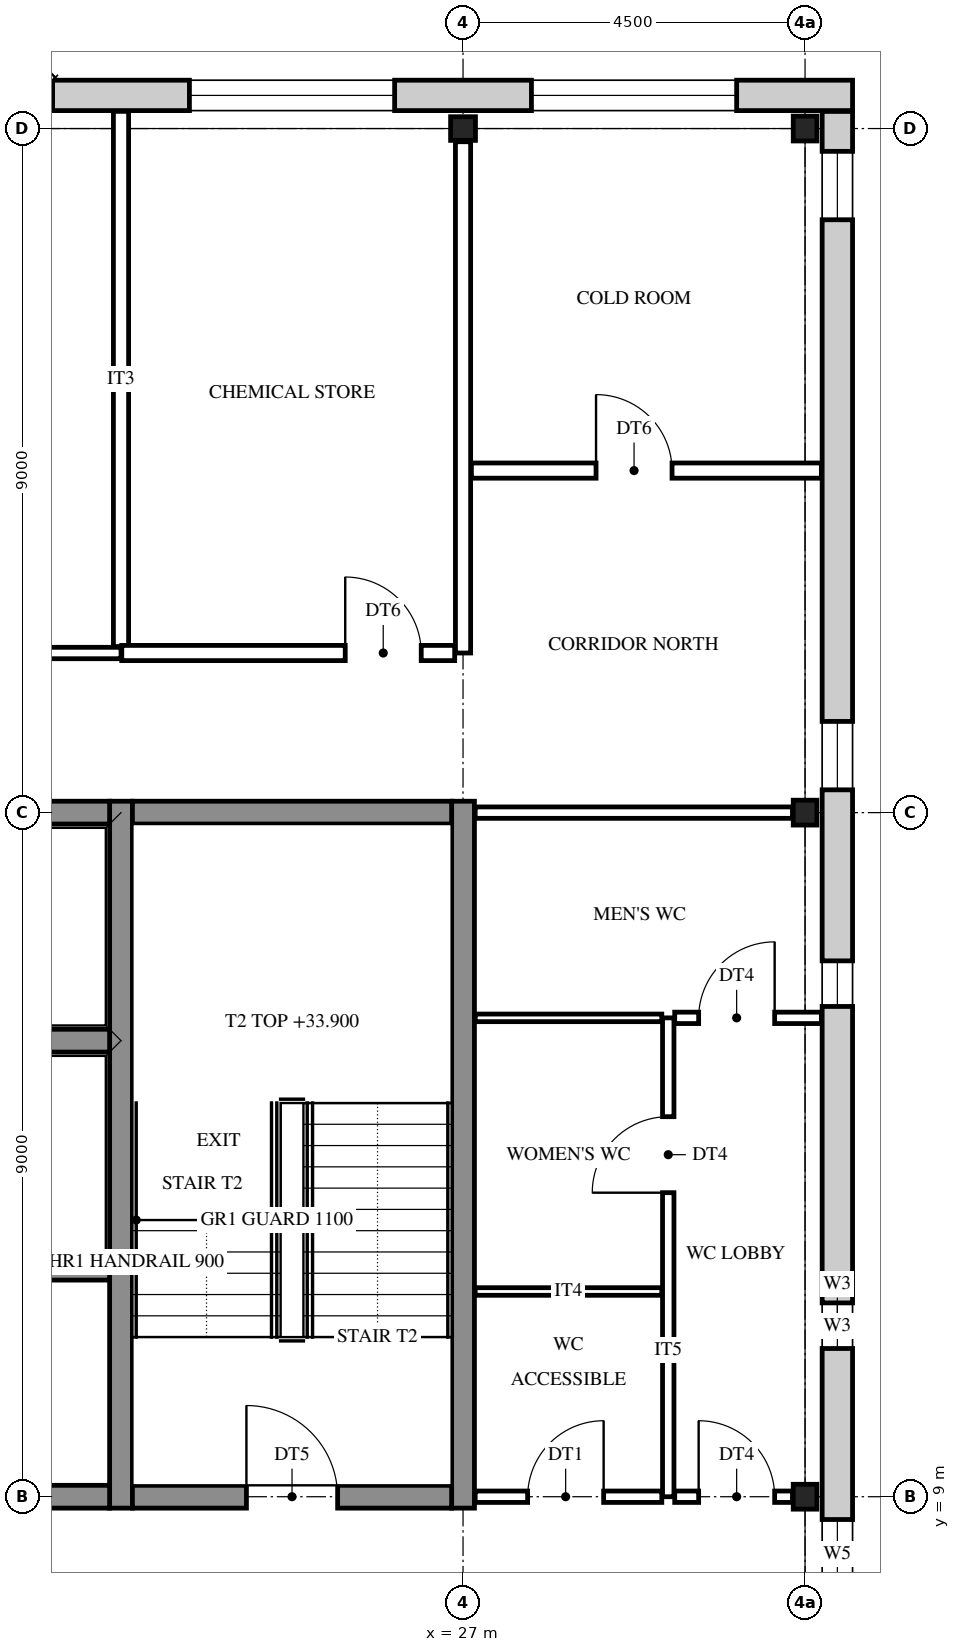
"""IFC4 building model, lengths in metres.
Left out: names, types, materials, properties, quantities, classifications, styles, units other than length and angle.
Written with IfcOpenShell. Run it as: python <this file> out.ifc"""

import sys

from ifc_helpers import new_model, si_unit, direction, frame, frame_2d, origin, origin_2d, place, context, subcontext, project, spatial, rectangle, i_section, extrude, element, fill, save


model = new_model("IFC4")
c1 = context("Model", 3, precision=1e-05, world=origin(), true_north=direction((0.0, 1.0)))
c2 = subcontext(c1, "Body", "Model", "MODEL_VIEW")
j1 = project(units=[si_unit("LENGTHUNIT", "METRE"), si_unit("PLANEANGLEUNIT", "RADIAN")], contexts=[c1])
p1 = place(None, origin())
s1 = spatial("IfcSite", under=j1, at=p1, CompositionType="ELEMENT")
p2 = place(p1, origin())
s2 = spatial("IfcBuilding", under=s1, at=p2, CompositionType="ELEMENT")
p3 = place(p2, frame((0.0, 0.0, 31.8)))
s3 = spatial("IfcBuildingStorey", under=s2, at=p3, CompositionType="ELEMENT", Elevation=31.8)
for number, where, z_axis, x_axis in (
    (1, (27.0, 27.0, 0.0), (0.0, 0.0, 1.0), (0.0, 1.0, 0.0)),
    (2, (31.5, 9.0, 0.0), (0.0, 0.0, 1.0), (1.0, 0.0, 0.0)),
    (3, (31.5, 18.0, 0.0), (0.0, 0.0, 1.0), (1.0, 0.0, 0.0)),
    (4, (31.5, 27.0, 0.0), (0.0, 0.0, 1.0), (1.0, 0.0, 0.0)),
):
    element("IfcColumn", number, at=place(p3, frame(where, z_axis=z_axis, x_axis=x_axis)), inside=s3, PredefinedType="COLUMN", context=c2, shape_type="SweptSolid", body=[
        extrude(i_section(OverallWidth=0.311, OverallDepth=0.327, WebThickness=0.016, FlangeThickness=0.025, FilletRadius=0.017, at=origin_2d()), origin(), (0.0, 0.0, 1.0), 4.2),
    ])
for number, where, z_axis, x_axis in (
    (5, (22.5, 8.85, 0.0), (0.0, 0.0, 1.0), (0.0, 1.0, 0.0)),
    (6, (27.0, 8.85, 0.0), (0.0, 0.0, 1.0), (0.0, 1.0, 0.0)),
):
    element("IfcWall", number, at=place(p3, frame(where, z_axis=z_axis, x_axis=x_axis)), inside=s3, PredefinedType="SHEAR", context=c2, shape_type="SweptSolid", body=[
        extrude(rectangle(XDim=9.3, YDim=0.3, at=frame_2d((4.65, 0.0))), origin(), (0.0, 0.0, 1.0), 4.2),
    ])
p4 = place(p3, frame((19.65, 9.0, 0.0), z_axis=(0.0, 0.0, 1.0), x_axis=(1.0, 0.0, 0.0)))
e7 = element("IfcWall", 7, at=p4, inside=s3, PredefinedType="SHEAR", context=c2, shape_type="SweptSolid", body=[
    extrude(rectangle(XDim=2.7, YDim=0.3, at=frame_2d((1.35, 0.0))), origin(), (0.0, 0.0, 1.0), 4.2),
])
p5 = place(p3, frame((22.65, 9.0, 0.0), z_axis=(0.0, 0.0, 1.0), x_axis=(1.0, 0.0, 0.0)))
e8 = element("IfcWall", 8, at=p5, inside=s3, PredefinedType="SHEAR", context=c2, shape_type="SweptSolid", body=[
    extrude(rectangle(XDim=4.2, YDim=0.3, at=frame_2d((2.1, 0.0))), origin(), (0.0, 0.0, 1.0), 4.2),
])
p6 = place(p5, frame((1.5, 0.0, 0.0)))
e9 = element("IfcOpeningElement", 9, at=p6, cuts=e8, PredefinedType="OPENING", context=c2, shape_type="SweptSolid", body=[
    extrude(rectangle(XDim=1.2, YDim=2.1, at=frame_2d((0.6, 1.05))), frame((0.0, 0.16, 0.0), z_axis=(0.0, -1.0, 0.0), x_axis=(1.0, 0.0, 0.0)), (0.0, 0.0, 1.0), 0.32),
])
for number, where, z_axis, x_axis in (
    (10, (19.65, 12.0, 0.0), (0.0, 0.0, 1.0), (1.0, 0.0, 0.0)),
    (11, (19.65, 15.0, 0.0), (0.0, 0.0, 1.0), (1.0, 0.0, 0.0)),
    (12, (19.65, 18.0, 0.0), (0.0, 0.0, 1.0), (1.0, 0.0, 0.0)),
):
    element("IfcWall", number, at=place(p3, frame(where, z_axis=z_axis, x_axis=x_axis)), inside=s3, PredefinedType="SHEAR", context=c2, shape_type="SweptSolid", body=[
        extrude(rectangle(XDim=2.7, YDim=0.3, at=frame_2d((1.35, 0.0))), origin(), (0.0, 0.0, 1.0), 4.2),
    ])
p7 = place(p3, frame((22.65, 18.0, 0.0), z_axis=(0.0, 0.0, 1.0), x_axis=(1.0, 0.0, 0.0)))
e13 = element("IfcWall", 13, at=p7, inside=s3, PredefinedType="SHEAR", context=c2, shape_type="SweptSolid", body=[
    extrude(rectangle(XDim=4.2, YDim=0.3, at=frame_2d((2.1, 0.0))), origin(), (0.0, 0.0, 1.0), 4.2),
])
p8 = place(p3, frame((-0.625, 27.436, 0.0), z_axis=(0.0, 0.0, 1.0), x_axis=(1.0, 0.0, 0.0)))
e14 = element("IfcWall", 14, at=p8, inside=s3, PredefinedType="STANDARD", context=c2, shape_type="SweptSolid", body=[
    extrude(rectangle(XDim=32.75, YDim=0.4, at=frame_2d((16.375, 0.0))), origin(), (0.0, 0.0, 1.0), 4.2),
])
p9 = place(p8, frame((1.525, 0.0, 0.9)))
e15 = element("IfcOpeningElement", 15, at=p9, cuts=e14, PredefinedType="OPENING", context=c2, shape_type="SweptSolid", body=[
    extrude(rectangle(XDim=2.7, YDim=2.5, at=frame_2d((1.35, 1.25))), frame((0.0, 0.21, 0.0), z_axis=(0.0, -1.0, 0.0), x_axis=(1.0, 0.0, 0.0)), (0.0, 0.0, 1.0), 0.42),
])
p10 = place(p8, frame((6.025, 0.0, 0.9)))
e16 = element("IfcOpeningElement", 16, at=p10, cuts=e14, PredefinedType="OPENING", context=c2, shape_type="SweptSolid", body=[
    extrude(rectangle(XDim=2.7, YDim=2.5, at=frame_2d((1.35, 1.25))), frame((0.0, 0.21, 0.0), z_axis=(0.0, -1.0, 0.0), x_axis=(1.0, 0.0, 0.0)), (0.0, 0.0, 1.0), 0.42),
])
p11 = place(p8, frame((10.525, 0.0, 0.9)))
e17 = element("IfcOpeningElement", 17, at=p11, cuts=e14, PredefinedType="OPENING", context=c2, shape_type="SweptSolid", body=[
    extrude(rectangle(XDim=2.7, YDim=2.5, at=frame_2d((1.35, 1.25))), frame((0.0, 0.21, 0.0), z_axis=(0.0, -1.0, 0.0), x_axis=(1.0, 0.0, 0.0)), (0.0, 0.0, 1.0), 0.42),
])
p12 = place(p8, frame((15.025, 0.0, 0.9)))
e18 = element("IfcOpeningElement", 18, at=p12, cuts=e14, PredefinedType="OPENING", context=c2, shape_type="SweptSolid", body=[
    extrude(rectangle(XDim=2.7, YDim=2.5, at=frame_2d((1.35, 1.25))), frame((0.0, 0.21, 0.0), z_axis=(0.0, -1.0, 0.0), x_axis=(1.0, 0.0, 0.0)), (0.0, 0.0, 1.0), 0.42),
])
p13 = place(p8, frame((19.525, 0.0, 0.9)))
e19 = element("IfcOpeningElement", 19, at=p13, cuts=e14, PredefinedType="OPENING", context=c2, shape_type="SweptSolid", body=[
    extrude(rectangle(XDim=2.7, YDim=2.5, at=frame_2d((1.35, 1.25))), frame((0.0, 0.21, 0.0), z_axis=(0.0, -1.0, 0.0), x_axis=(1.0, 0.0, 0.0)), (0.0, 0.0, 1.0), 0.42),
])
p14 = place(p8, frame((24.025, 0.0, 0.9)))
e20 = element("IfcOpeningElement", 20, at=p14, cuts=e14, PredefinedType="OPENING", context=c2, shape_type="SweptSolid", body=[
    extrude(rectangle(XDim=2.7, YDim=2.5, at=frame_2d((1.35, 1.25))), frame((0.0, 0.21, 0.0), z_axis=(0.0, -1.0, 0.0), x_axis=(1.0, 0.0, 0.0)), (0.0, 0.0, 1.0), 0.42),
])
p15 = place(p8, frame((28.525, 0.0, 0.9)))
e21 = element("IfcOpeningElement", 21, at=p15, cuts=e14, PredefinedType="OPENING", context=c2, shape_type="SweptSolid", body=[
    extrude(rectangle(XDim=2.7, YDim=2.5, at=frame_2d((1.35, 1.25))), frame((0.0, 0.21, 0.0), z_axis=(0.0, -1.0, 0.0), x_axis=(1.0, 0.0, 0.0)), (0.0, 0.0, 1.0), 0.42),
])
p16 = place(p3, frame((31.925, 27.225, 0.0), z_axis=(0.0, 0.0, 1.0), x_axis=(0.0, -1.0, 0.0)))
e22 = element("IfcWall", 22, at=p16, inside=s3, PredefinedType="STANDARD", context=c2, shape_type="SweptSolid", body=[
    extrude(rectangle(XDim=27.45, YDim=0.4, at=frame_2d((13.725, 0.0))), origin(), (0.0, 0.0, 1.0), 4.2),
])
p17 = place(p16, frame((26.025, 0.0, 0.9)))
e23 = element("IfcOpeningElement", 23, at=p17, cuts=e22, PredefinedType="OPENING", context=c2, shape_type="SweptSolid", body=[
    extrude(rectangle(XDim=0.9, YDim=2.0, at=frame_2d((0.45, 1.0))), frame((0.0, 0.21, 0.0), z_axis=(0.0, -1.0, 0.0), x_axis=(1.0, 0.0, 0.0)), (0.0, 0.0, 1.0), 0.42),
])
p18 = place(p16, frame((18.525, 0.0, 0.9)))
e24 = element("IfcOpeningElement", 24, at=p18, cuts=e22, PredefinedType="OPENING", context=c2, shape_type="SweptSolid", body=[
    extrude(rectangle(XDim=0.9, YDim=2.0, at=frame_2d((0.45, 1.0))), frame((0.0, 0.21, 0.0), z_axis=(0.0, -1.0, 0.0), x_axis=(1.0, 0.0, 0.0)), (0.0, 0.0, 1.0), 0.42),
])
p19 = place(p16, frame((15.675, 0.0, 1.6)))
e25 = element("IfcOpeningElement", 25, at=p19, cuts=e22, PredefinedType="OPENING", context=c2, shape_type="SweptSolid", body=[
    extrude(rectangle(XDim=0.6, YDim=0.9, at=frame_2d((0.3, 0.45))), frame((0.0, 0.21, 0.0), z_axis=(0.0, -1.0, 0.0), x_axis=(1.0, 0.0, 0.0)), (0.0, 0.0, 1.0), 0.42),
])
p20 = place(p16, frame((11.175, 0.0, 1.6)))
e26 = element("IfcOpeningElement", 26, at=p20, cuts=e22, PredefinedType="OPENING", context=c2, shape_type="SweptSolid", body=[
    extrude(rectangle(XDim=0.6, YDim=0.9, at=frame_2d((0.3, 0.45))), frame((0.0, 0.21, 0.0), z_axis=(0.0, -1.0, 0.0), x_axis=(1.0, 0.0, 0.0)), (0.0, 0.0, 1.0), 0.42),
])
p21 = place(p16, frame((8.025, 0.0, 0.9)))
e27 = element("IfcOpeningElement", 27, at=p21, cuts=e22, PredefinedType="OPENING", context=c2, shape_type="SweptSolid", body=[
    extrude(rectangle(XDim=0.9, YDim=2.0, at=frame_2d((0.45, 1.0))), frame((0.0, 0.21, 0.0), z_axis=(0.0, -1.0, 0.0), x_axis=(1.0, 0.0, 0.0)), (0.0, 0.0, 1.0), 0.42),
])
p22 = place(p16, frame((0.525, 0.0, 0.9)))
e28 = element("IfcOpeningElement", 28, at=p22, cuts=e22, PredefinedType="OPENING", context=c2, shape_type="SweptSolid", body=[
    extrude(rectangle(XDim=0.9, YDim=2.0, at=frame_2d((0.45, 1.0))), frame((0.0, 0.21, 0.0), z_axis=(0.0, -1.0, 0.0), x_axis=(1.0, 0.0, 0.0)), (0.0, 0.0, 1.0), 0.42),
])
p23 = place(p3, frame((22.5, 20.185, 0.0), z_axis=(0.0, 0.0, 1.0), x_axis=(0.0, 1.0, 0.0)))
e29 = element("IfcWall", 29, at=p23, inside=s3, PredefinedType="PARTITIONING", context=c2, shape_type="SweptSolid", body=[
    extrude(rectangle(XDim=7.041, YDim=0.2, at=frame_2d((3.521, 0.0))), origin(), (0.0, 0.0, 1.0), 3.537),
])
p24 = place(p3, frame((27.0, 20.1, 0.0), z_axis=(0.0, 0.0, 1.0), x_axis=(0.0, 1.0, 0.0)))
e30 = element("IfcWall", 30, at=p24, inside=s3, PredefinedType="PARTITIONING", context=c2, shape_type="SweptSolid", body=[
    extrude(rectangle(XDim=6.726, YDim=0.2, at=frame_2d((3.363, 0.0))), origin(), (0.0, 0.0, 1.0), 3.537),
])
p25 = place(p3, frame((29.7, 9.0, 0.0), z_axis=(0.0, 0.0, 1.0), x_axis=(0.0, 1.0, 0.0)))
e31 = element("IfcWall", 31, at=p25, inside=s3, PredefinedType="PARTITIONING", context=c2, shape_type="SweptSolid", body=[
    extrude(rectangle(XDim=6.3, YDim=0.15, at=frame_2d((3.15, 0.0))), origin(), (0.0, 0.0, 1.0), 3.537),
])
p26 = place(p25, frame((4.0, 0.0, 0.0)))
e32 = element("IfcOpeningElement", 32, at=p26, cuts=e31, PredefinedType="OPENING", context=c2, shape_type="SweptSolid", body=[
    extrude(rectangle(XDim=1.0, YDim=2.1, at=frame_2d((0.5, 1.05))), frame((0.0, 0.085, 0.0), z_axis=(0.0, -1.0, 0.0), x_axis=(1.0, 0.0, 0.0)), (0.0, 0.0, 1.0), 0.17),
])
p27 = place(p3, frame((27.16, 9.0, 0.0), z_axis=(0.0, 0.0, 1.0), x_axis=(1.0, 0.0, 0.0)))
e33 = element("IfcWall", 33, at=p27, inside=s3, PredefinedType="PARTITIONING", context=c2, shape_type="SweptSolid", body=[
    extrude(rectangle(XDim=2.455, YDim=0.15, at=frame_2d((1.228, 0.0))), origin(), (0.0, 0.0, 1.0), 3.537),
])
p28 = place(p27, frame((0.69, 0.0, 0.0)))
e34 = element("IfcOpeningElement", 34, at=p28, cuts=e33, PredefinedType="OPENING", context=c2, shape_type="SweptSolid", body=[
    extrude(rectangle(XDim=1.0, YDim=2.1, at=frame_2d((0.5, 1.05))), frame((0.0, 0.085, 0.0), z_axis=(0.0, -1.0, 0.0), x_axis=(1.0, 0.0, 0.0)), (0.0, 0.0, 1.0), 0.17),
])
p29 = place(p3, frame((29.785, 9.0, 0.0), z_axis=(0.0, 0.0, 1.0), x_axis=(1.0, 0.0, 0.0)))
e35 = element("IfcWall", 35, at=p29, inside=s3, PredefinedType="PARTITIONING", context=c2, shape_type="SweptSolid", body=[
    extrude(rectangle(XDim=1.55, YDim=0.15, at=frame_2d((0.775, 0.0))), origin(), (0.0, 0.0, 1.0), 3.537),
])
p30 = place(p29, frame((0.315, 0.0, 0.0)))
e36 = element("IfcOpeningElement", 36, at=p30, cuts=e35, PredefinedType="OPENING", context=c2, shape_type="SweptSolid", body=[
    extrude(rectangle(XDim=1.0, YDim=2.1, at=frame_2d((0.5, 1.05))), frame((0.0, 0.085, 0.0), z_axis=(0.0, -1.0, 0.0), x_axis=(1.0, 0.0, 0.0)), (0.0, 0.0, 1.0), 0.17),
])
for number, where, z_axis, x_axis in (
    (37, (27.16, 11.7, 0.0), (0.0, 0.0, 1.0), (1.0, 0.0, 0.0)),
    (38, (27.16, 15.3, 0.0), (0.0, 0.0, 1.0), (1.0, 0.0, 0.0)),
):
    element("IfcWall", number, at=place(p3, frame(where, z_axis=z_axis, x_axis=x_axis)), inside=s3, PredefinedType="PARTITIONING", context=c2, shape_type="SweptSolid", body=[
        extrude(rectangle(XDim=2.455, YDim=0.1, at=frame_2d((1.228, 0.0))), origin(), (0.0, 0.0, 1.0), 3.537),
    ])
p31 = place(p3, frame((29.785, 15.3, 0.0), z_axis=(0.0, 0.0, 1.0), x_axis=(1.0, 0.0, 0.0)))
e39 = element("IfcWall", 39, at=p31, inside=s3, PredefinedType="PARTITIONING", context=c2, shape_type="SweptSolid", body=[
    extrude(rectangle(XDim=1.93, YDim=0.15, at=frame_2d((0.965, 0.0))), origin(), (0.0, 0.0, 1.0), 3.537),
])
p32 = place(p31, frame((0.315, 0.0, 0.0)))
e40 = element("IfcOpeningElement", 40, at=p32, cuts=e39, PredefinedType="OPENING", context=c2, shape_type="SweptSolid", body=[
    extrude(rectangle(XDim=1.0, YDim=2.1, at=frame_2d((0.5, 1.05))), frame((0.0, 0.085, 0.0), z_axis=(0.0, -1.0, 0.0), x_axis=(1.0, 0.0, 0.0)), (0.0, 0.0, 1.0), 0.17),
])
p33 = place(p3, frame((27.16, 18.0, 0.0), z_axis=(0.0, 0.0, 1.0), x_axis=(1.0, 0.0, 0.0)))
e41 = element("IfcWall", 41, at=p33, inside=s3, PredefinedType="PARTITIONING", context=c2, shape_type="SweptSolid", body=[
    extrude(rectangle(XDim=4.175, YDim=0.15, at=frame_2d((2.087, 0.0))), origin(), (0.0, 0.0, 1.0), 3.537),
])
p34 = place(p3, frame((6.9, 20.1, 0.0), z_axis=(0.0, 0.0, 1.0), x_axis=(1.0, 0.0, 0.0)))
e42 = element("IfcWall", 42, at=p34, inside=s3, PredefinedType="PARTITIONING", context=c2, shape_type="SweptSolid", body=[
    extrude(rectangle(XDim=15.6, YDim=0.15, at=frame_2d((7.8, 0.0))), origin(), (0.0, 0.0, 1.0), 3.537),
])
p35 = place(p34, frame((2.75, 0.0, 0.0)))
e43 = element("IfcOpeningElement", 43, at=p35, cuts=e42, PredefinedType="OPENING", context=c2, shape_type="SweptSolid", body=[
    extrude(rectangle(XDim=1.1, YDim=2.1, at=frame_2d((0.55, 1.05))), frame((0.0, 0.085, 0.0), z_axis=(0.0, -1.0, 0.0), x_axis=(1.0, 0.0, 0.0)), (0.0, 0.0, 1.0), 0.17),
])
p36 = place(p34, frame((10.55, 0.0, 0.0)))
e44 = element("IfcOpeningElement", 44, at=p36, cuts=e42, PredefinedType="OPENING", context=c2, shape_type="SweptSolid", body=[
    extrude(rectangle(XDim=1.1, YDim=2.1, at=frame_2d((0.55, 1.05))), frame((0.0, 0.085, 0.0), z_axis=(0.0, -1.0, 0.0), x_axis=(1.0, 0.0, 0.0)), (0.0, 0.0, 1.0), 0.17),
])
p37 = place(p3, frame((22.51, 20.1, 0.0), z_axis=(0.0, 0.0, 1.0), x_axis=(1.0, 0.0, 0.0)))
e45 = element("IfcWall", 45, at=p37, inside=s3, PredefinedType="PARTITIONING", context=c2, shape_type="SweptSolid", body=[
    extrude(rectangle(XDim=4.38, YDim=0.2, at=frame_2d((2.19, 0.0))), origin(), (0.0, 0.0, 1.0), 3.537),
])
p38 = place(p37, frame((2.94, 0.0, 0.0)))
e46 = element("IfcOpeningElement", 46, at=p38, cuts=e45, PredefinedType="OPENING", context=c2, shape_type="SweptSolid", body=[
    extrude(rectangle(XDim=1.0, YDim=2.1, at=frame_2d((0.5, 1.05))), frame((0.0, 0.11, 0.0), z_axis=(0.0, -1.0, 0.0), x_axis=(1.0, 0.0, 0.0)), (0.0, 0.0, 1.0), 0.22),
])
p39 = place(p3, frame((27.11, 22.5, 0.0), z_axis=(0.0, 0.0, 1.0), x_axis=(1.0, 0.0, 0.0)))
e47 = element("IfcWall", 47, at=p39, inside=s3, PredefinedType="PARTITIONING", context=c2, shape_type="SweptSolid", body=[
    extrude(rectangle(XDim=4.605, YDim=0.2, at=frame_2d((2.302, 0.0))), origin(), (0.0, 0.0, 1.0), 3.537),
])
p40 = place(p39, frame((1.64, 0.0, 0.0)))
e48 = element("IfcOpeningElement", 48, at=p40, cuts=e47, PredefinedType="OPENING", context=c2, shape_type="SweptSolid", body=[
    extrude(rectangle(XDim=1.0, YDim=2.1, at=frame_2d((0.5, 1.05))), frame((0.0, 0.11, 0.0), z_axis=(0.0, -1.0, 0.0), x_axis=(1.0, 0.0, 0.0)), (0.0, 0.0, 1.0), 0.22),
])
p41 = place(p14, origin())
e49 = element("IfcWindow", 49, at=p41, inside=s3, PartitioningType="SINGLE_PANEL", PredefinedType="WINDOW", context=c2, shape_type="SweptSolid", body=[
    extrude(rectangle(XDim=2.7, YDim=2.5, at=frame_2d((1.35, 1.25))), frame((0.0, 0.03, 0.0), z_axis=(0.0, -1.0, 0.0), x_axis=(1.0, 0.0, 0.0)), (0.0, 0.0, 1.0), 0.06),
])
fill(e20, e49)
p42 = place(p15, origin())
e50 = element("IfcWindow", 50, at=p42, inside=s3, PartitioningType="SINGLE_PANEL", PredefinedType="WINDOW", context=c2, shape_type="SweptSolid", body=[
    extrude(rectangle(XDim=2.7, YDim=2.5, at=frame_2d((1.35, 1.25))), frame((0.0, 0.03, 0.0), z_axis=(0.0, -1.0, 0.0), x_axis=(1.0, 0.0, 0.0)), (0.0, 0.0, 1.0), 0.06),
])
fill(e21, e50)
p43 = place(p18, origin())
e51 = element("IfcWindow", 51, at=p43, inside=s3, PartitioningType="SINGLE_PANEL", PredefinedType="WINDOW", context=c2, shape_type="SweptSolid", body=[
    extrude(rectangle(XDim=0.9, YDim=2.0, at=frame_2d((0.45, 1.0))), frame((0.0, 0.03, 0.0), z_axis=(0.0, -1.0, 0.0), x_axis=(1.0, 0.0, 0.0)), (0.0, 0.0, 1.0), 0.06),
])
fill(e24, e51)
p44 = place(p19, origin())
e52 = element("IfcWindow", 52, at=p44, inside=s3, PartitioningType="SINGLE_PANEL", PredefinedType="WINDOW", context=c2, shape_type="SweptSolid", body=[
    extrude(rectangle(XDim=0.6, YDim=0.9, at=frame_2d((0.3, 0.45))), frame((0.0, 0.03, 0.0), z_axis=(0.0, -1.0, 0.0), x_axis=(1.0, 0.0, 0.0)), (0.0, 0.0, 1.0), 0.06),
])
fill(e25, e52)
p45 = place(p20, origin())
e53 = element("IfcWindow", 53, at=p45, inside=s3, PartitioningType="SINGLE_PANEL", PredefinedType="WINDOW", context=c2, shape_type="SweptSolid", body=[
    extrude(rectangle(XDim=0.6, YDim=0.9, at=frame_2d((0.3, 0.45))), frame((0.0, 0.03, 0.0), z_axis=(0.0, -1.0, 0.0), x_axis=(1.0, 0.0, 0.0)), (0.0, 0.0, 1.0), 0.06),
])
fill(e26, e53)
p46 = place(p21, origin())
e54 = element("IfcWindow", 54, at=p46, inside=s3, PartitioningType="SINGLE_PANEL", PredefinedType="WINDOW", context=c2, shape_type="SweptSolid", body=[
    extrude(rectangle(XDim=0.9, YDim=2.0, at=frame_2d((0.45, 1.0))), frame((0.0, 0.03, 0.0), z_axis=(0.0, -1.0, 0.0), x_axis=(1.0, 0.0, 0.0)), (0.0, 0.0, 1.0), 0.06),
])
fill(e27, e54)
p47 = place(p22, origin())
e55 = element("IfcWindow", 55, at=p47, inside=s3, PartitioningType="SINGLE_PANEL", PredefinedType="WINDOW", context=c2, shape_type="SweptSolid", body=[
    extrude(rectangle(XDim=0.9, YDim=2.0, at=frame_2d((0.45, 1.0))), frame((0.0, 0.03, 0.0), z_axis=(0.0, -1.0, 0.0), x_axis=(1.0, 0.0, 0.0)), (0.0, 0.0, 1.0), 0.06),
])
fill(e28, e55)
p48 = place(p6, origin())
e56 = element("IfcDoor", 56, at=p48, inside=s3, OperationType="SINGLE_SWING_LEFT", PredefinedType="DOOR", context=c2, shape_type="SweptSolid", body=[
    extrude(rectangle(XDim=1.2, YDim=2.1, at=frame_2d((0.6, 1.05))), frame((0.0, 0.025, 0.0), z_axis=(0.0, -1.0, 0.0), x_axis=(1.0, 0.0, 0.0)), (0.0, 0.0, 1.0), 0.05),
])
fill(e9, e56)
p49 = place(p28, origin())
e57 = element("IfcDoor", 57, at=p49, inside=s3, OperationType="SINGLE_SWING_RIGHT", PredefinedType="DOOR", context=c2, shape_type="SweptSolid", body=[
    extrude(rectangle(XDim=1.0, YDim=2.1, at=frame_2d((0.5, 1.05))), frame((0.0, 0.025, 0.0), z_axis=(0.0, -1.0, 0.0), x_axis=(1.0, 0.0, 0.0)), (0.0, 0.0, 1.0), 0.05),
])
fill(e34, e57)
p50 = place(p26, origin())
e58 = element("IfcDoor", 58, at=p50, inside=s3, OperationType="SINGLE_SWING_LEFT", PredefinedType="DOOR", context=c2, shape_type="SweptSolid", body=[
    extrude(rectangle(XDim=1.0, YDim=2.1, at=frame_2d((0.5, 1.05))), frame((0.0, 0.025, 0.0), z_axis=(0.0, -1.0, 0.0), x_axis=(1.0, 0.0, 0.0)), (0.0, 0.0, 1.0), 0.05),
])
fill(e32, e58)
p51 = place(p32, origin())
e59 = element("IfcDoor", 59, at=p51, inside=s3, OperationType="SINGLE_SWING_RIGHT", PredefinedType="DOOR", context=c2, shape_type="SweptSolid", body=[
    extrude(rectangle(XDim=1.0, YDim=2.1, at=frame_2d((0.5, 1.05))), frame((0.0, 0.025, 0.0), z_axis=(0.0, -1.0, 0.0), x_axis=(1.0, 0.0, 0.0)), (0.0, 0.0, 1.0), 0.05),
])
fill(e40, e59)
p52 = place(p30, origin())
e60 = element("IfcDoor", 60, at=p52, inside=s3, OperationType="SINGLE_SWING_LEFT", PredefinedType="DOOR", context=c2, shape_type="SweptSolid", body=[
    extrude(rectangle(XDim=1.0, YDim=2.1, at=frame_2d((0.5, 1.05))), frame((0.0, 0.025, 0.0), z_axis=(0.0, -1.0, 0.0), x_axis=(1.0, 0.0, 0.0)), (0.0, 0.0, 1.0), 0.05),
])
fill(e36, e60)
p53 = place(p38, origin())
e61 = element("IfcDoor", 61, at=p53, inside=s3, OperationType="SINGLE_SWING_LEFT", PredefinedType="DOOR", context=c2, shape_type="SweptSolid", body=[
    extrude(rectangle(XDim=1.0, YDim=2.1, at=frame_2d((0.5, 1.05))), frame((0.0, 0.025, 0.0), z_axis=(0.0, -1.0, 0.0), x_axis=(1.0, 0.0, 0.0)), (0.0, 0.0, 1.0), 0.05),
])
fill(e46, e61)
p54 = place(p40, origin())
e62 = element("IfcDoor", 62, at=p54, inside=s3, OperationType="SINGLE_SWING_LEFT", PredefinedType="DOOR", context=c2, shape_type="SweptSolid", body=[
    extrude(rectangle(XDim=1.0, YDim=2.1, at=frame_2d((0.5, 1.05))), frame((0.0, 0.025, 0.0), z_axis=(0.0, -1.0, 0.0), x_axis=(1.0, 0.0, 0.0)), (0.0, 0.0, 1.0), 0.05),
])
fill(e48, e62)
save(model, sys.argv[1])
